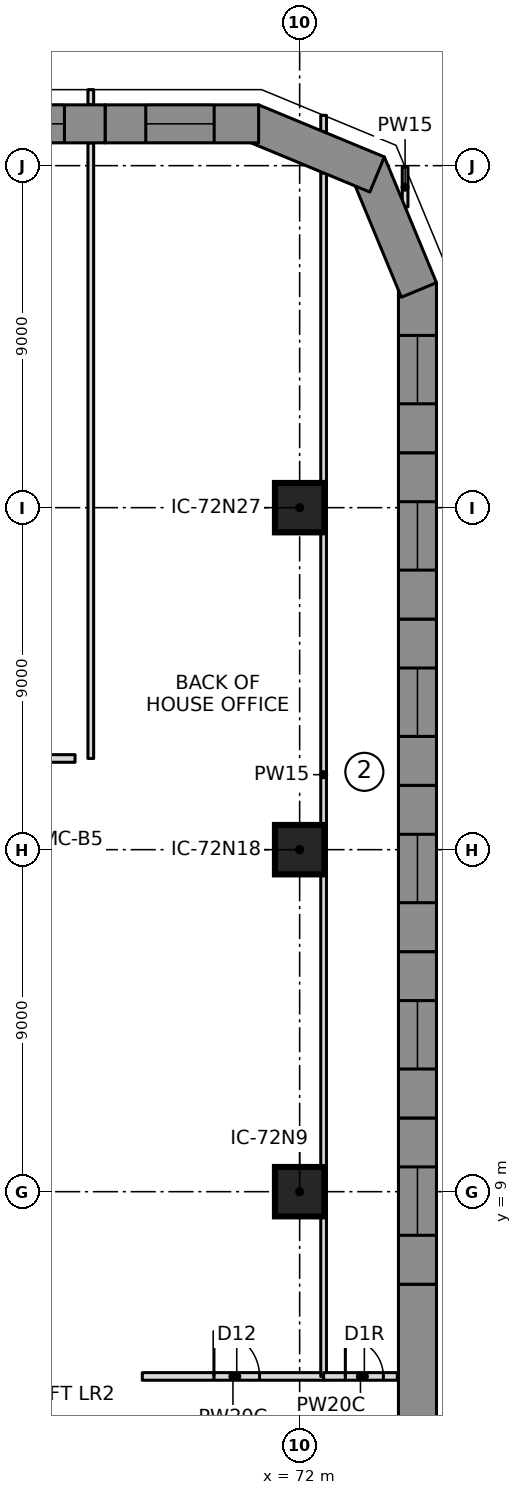
"""IFC4 building model, lengths in metres.
Left out: names, types, materials, properties, quantities, classifications, styles, units other than length and angle.
Written with IfcOpenShell. Run it as: python <this file> out.ifc"""

import sys

from ifc_helpers import new_model, si_unit, direction, frame, frame_2d, origin, origin_2d, place, context, subcontext, project, spatial, polyline, rectangle, outline, extrude, element, fill, save


model = new_model("IFC4")
c1 = context("Model", 3, precision=1e-05, world=origin(), true_north=direction((0.0, 1.0)))
c2 = subcontext(c1, "Body", "Model", "MODEL_VIEW")
j1 = project(units=[si_unit("LENGTHUNIT", "METRE"), si_unit("PLANEANGLEUNIT", "RADIAN")], contexts=[c1])
p1 = place(None, origin())
s1 = spatial("IfcSite", under=j1, at=p1, CompositionType="ELEMENT")
p2 = place(p1, origin())
s2 = spatial("IfcBuilding", under=s1, at=p2, CompositionType="ELEMENT")
p3 = place(p2, frame((0.0, 0.0, 24.0)))
s3 = spatial("IfcBuildingStorey", under=s2, at=p3, CompositionType="ELEMENT", Elevation=24.0)
for number, where, z_axis, x_axis in (
    (1, (72.0, 9.0, 0.0), (0.0, 0.0, 1.0), (1.0, 0.0, 0.0)),
    (2, (72.0, 18.0, 0.0), (0.0, 0.0, 1.0), (1.0, 0.0, 0.0)),
    (3, (72.0, 27.0, 0.0), (0.0, 0.0, 1.0), (1.0, 0.0, 0.0)),
):
    element("IfcColumn", number, at=place(p3, frame(where, z_axis=z_axis, x_axis=x_axis)), inside=s3, PredefinedType="COLUMN", context=c2, shape_type="SweptSolid", body=[
        extrude(rectangle(XDim=1.3, YDim=1.3, at=origin_2d()), origin(), (0.0, 0.0, 1.0), 4.65),
    ])
p4 = place(p3, frame((75.1, 2.188, 0.0), z_axis=(0.0, 0.0, 1.0), x_axis=(0.0, 1.0, 0.0)))
e4 = element("IfcWall", 4, at=p4, inside=s3, PredefinedType="NOTDEFINED", context=c2, shape_type="SweptSolid", body=[
    extrude(outline(polyline([(0.0, -0.5), (4.376, -0.5), (4.376, 0.5), (0.0, 0.5), (0.0, -0.5)])), origin(), (0.0, 0.0, 1.0), 4.7),
])
p5 = place(p3, frame((75.1, 6.564, 0.0), z_axis=(0.0, 0.0, 1.0), x_axis=(0.0, 1.0, 0.0)))
e5 = element("IfcWall", 5, at=p5, inside=s3, PredefinedType="NOTDEFINED", context=c2, shape_type="SweptSolid", body=[
    extrude(outline(polyline([(0.0, -0.5), (4.376, -0.5), (4.376, 0.5), (0.0, 0.5), (0.0, -0.5)])), origin(), (0.0, 0.0, 1.0), 4.7),
])
p6 = place(p5, frame((1.288, 0.0, 0.9)))
e6 = element("IfcOpeningElement", 6, at=p6, cuts=e5, PredefinedType="OPENING", context=c2, shape_type="SweptSolid", body=[
    extrude(rectangle(XDim=1.8, YDim=2.4, at=frame_2d((0.9, 1.2))), frame((0.0, 0.51, 0.0), z_axis=(0.0, -1.0, 0.0), x_axis=(1.0, 0.0, 0.0)), (0.0, 0.0, 1.0), 1.02),
])
p7 = place(p3, frame((75.1, 10.94, 0.0), z_axis=(0.0, 0.0, 1.0), x_axis=(0.0, 1.0, 0.0)))
e7 = element("IfcWall", 7, at=p7, inside=s3, PredefinedType="NOTDEFINED", context=c2, shape_type="SweptSolid", body=[
    extrude(outline(polyline([(0.0, -0.5), (4.376, -0.5), (4.376, 0.5), (0.0, 0.5), (0.0, -0.5)])), origin(), (0.0, 0.0, 1.0), 4.7),
])
p8 = place(p7, frame((1.288, 0.0, 0.9)))
e8 = element("IfcOpeningElement", 8, at=p8, cuts=e7, PredefinedType="OPENING", context=c2, shape_type="SweptSolid", body=[
    extrude(rectangle(XDim=1.8, YDim=2.4, at=frame_2d((0.9, 1.2))), frame((0.0, 0.51, 0.0), z_axis=(0.0, -1.0, 0.0), x_axis=(1.0, 0.0, 0.0)), (0.0, 0.0, 1.0), 1.02),
])
p9 = place(p3, frame((75.1, 15.316, 0.0), z_axis=(0.0, 0.0, 1.0), x_axis=(0.0, 1.0, 0.0)))
e9 = element("IfcWall", 9, at=p9, inside=s3, PredefinedType="NOTDEFINED", context=c2, shape_type="SweptSolid", body=[
    extrude(outline(polyline([(0.0, -0.5), (4.376, -0.5), (4.376, 0.5), (0.0, 0.5), (0.0, -0.5)])), origin(), (0.0, 0.0, 1.0), 4.7),
])
p10 = place(p9, frame((1.288, 0.0, 0.9)))
e10 = element("IfcOpeningElement", 10, at=p10, cuts=e9, PredefinedType="OPENING", context=c2, shape_type="SweptSolid", body=[
    extrude(rectangle(XDim=1.8, YDim=2.4, at=frame_2d((0.9, 1.2))), frame((0.0, 0.51, 0.0), z_axis=(0.0, -1.0, 0.0), x_axis=(1.0, 0.0, 0.0)), (0.0, 0.0, 1.0), 1.02),
])
p11 = place(p3, frame((75.1, 19.693, 0.0), z_axis=(0.0, 0.0, 1.0), x_axis=(0.0, 1.0, 0.0)))
e11 = element("IfcWall", 11, at=p11, inside=s3, PredefinedType="NOTDEFINED", context=c2, shape_type="SweptSolid", body=[
    extrude(outline(polyline([(0.0, -0.5), (4.376, -0.5), (4.376, 0.5), (0.0, 0.5), (0.0, -0.5)])), origin(), (0.0, 0.0, 1.0), 4.7),
])
p12 = place(p11, frame((1.288, 0.0, 0.9)))
e12 = element("IfcOpeningElement", 12, at=p12, cuts=e11, PredefinedType="OPENING", context=c2, shape_type="SweptSolid", body=[
    extrude(rectangle(XDim=1.8, YDim=2.4, at=frame_2d((0.9, 1.2))), frame((0.0, 0.51, 0.0), z_axis=(0.0, -1.0, 0.0), x_axis=(1.0, 0.0, 0.0)), (0.0, 0.0, 1.0), 1.02),
])
p13 = place(p3, frame((75.1, 24.069, 0.0), z_axis=(0.0, 0.0, 1.0), x_axis=(0.0, 1.0, 0.0)))
e13 = element("IfcWall", 13, at=p13, inside=s3, PredefinedType="NOTDEFINED", context=c2, shape_type="SweptSolid", body=[
    extrude(outline(polyline([(0.0, -0.5), (4.376, -0.5), (4.376, 0.5), (0.0, 0.5), (0.0, -0.5)])), origin(), (0.0, 0.0, 1.0), 4.7),
])
p14 = place(p13, frame((1.288, 0.0, 0.9)))
e14 = element("IfcOpeningElement", 14, at=p14, cuts=e13, PredefinedType="OPENING", context=c2, shape_type="SweptSolid", body=[
    extrude(rectangle(XDim=1.8, YDim=2.4, at=frame_2d((0.9, 1.2))), frame((0.0, 0.51, 0.0), z_axis=(0.0, -1.0, 0.0), x_axis=(1.0, 0.0, 0.0)), (0.0, 0.0, 1.0), 1.02),
])
p15 = place(p3, frame((75.1, 28.445, 0.0), z_axis=(0.0, 0.0, 1.0), x_axis=(0.0, 1.0, 0.0)))
e15 = element("IfcWall", 15, at=p15, inside=s3, PredefinedType="NOTDEFINED", context=c2, shape_type="SweptSolid", body=[
    extrude(outline(polyline([(0.0, -0.5), (4.476, -0.5), (4.277, 0.5), (0.0, 0.5), (0.0, -0.5)])), origin(), (0.0, 0.0, 1.0), 4.7),
])
p16 = place(p15, frame((1.288, 0.0, 0.9)))
e16 = element("IfcOpeningElement", 16, at=p16, cuts=e15, PredefinedType="OPENING", context=c2, shape_type="SweptSolid", body=[
    extrude(rectangle(XDim=1.8, YDim=2.4, at=frame_2d((0.9, 1.2))), frame((0.0, 0.51, 0.0), z_axis=(0.0, -1.0, 0.0), x_axis=(1.0, 0.0, 0.0)), (0.0, 0.0, 1.0), 1.02),
])
p17 = place(p3, frame((75.1, 32.821, 0.0), z_axis=(0.0, 0.0, 1.0), x_axis=(-0.382724875529, 0.923862365102, 0.0)))
e17 = element("IfcWall", 17, at=p17, inside=s3, PredefinedType="NOTDEFINED", context=c2, shape_type="SweptSolid", body=[
    extrude(outline(polyline([(-0.1, -0.5), (3.482, -0.5), (3.068, 0.5), (0.1, 0.5), (-0.1, -0.5)])), origin(), (0.0, 0.0, 1.0), 4.7),
])
p18 = place(p3, frame((73.847, 35.847, 0.0), z_axis=(0.0, 0.0, 1.0), x_axis=(-0.923862365102, 0.382724875529, 0.0)))
e18 = element("IfcWall", 18, at=p18, inside=s3, PredefinedType="NOTDEFINED", context=c2, shape_type="SweptSolid", body=[
    extrude(outline(polyline([(-0.207, -0.5), (3.375, -0.5), (3.175, 0.5), (0.207, 0.5), (-0.207, -0.5)])), origin(), (0.0, 0.0, 1.0), 4.7),
])
p19 = place(p3, frame((70.821, 37.1, 0.0), z_axis=(0.0, 0.0, 1.0), x_axis=(-1.0, 0.0, 0.0)))
e19 = element("IfcWall", 19, at=p19, inside=s3, PredefinedType="NOTDEFINED", context=c2, shape_type="SweptSolid", body=[
    extrude(outline(polyline([(-0.1, -0.5), (3.94, -0.5), (3.94, 0.5), (0.1, 0.5), (-0.1, -0.5)])), origin(), (0.0, 0.0, 1.0), 4.7),
])
p20 = place(p19, frame((1.07, 0.0, 0.9)))
e20 = element("IfcOpeningElement", 20, at=p20, cuts=e19, PredefinedType="OPENING", context=c2, shape_type="SweptSolid", body=[
    extrude(rectangle(XDim=1.8, YDim=2.4, at=frame_2d((0.9, 1.2))), frame((0.0, 0.51, 0.0), z_axis=(0.0, -1.0, 0.0), x_axis=(1.0, 0.0, 0.0)), (0.0, 0.0, 1.0), 1.02),
])
p21 = place(p3, frame((66.881, 37.1, 0.0), z_axis=(0.0, 0.0, 1.0), x_axis=(-1.0, 0.0, 0.0)))
e21 = element("IfcWall", 21, at=p21, inside=s3, PredefinedType="NOTDEFINED", context=c2, shape_type="SweptSolid", body=[
    extrude(outline(polyline([(0.0, -0.5), (3.94, -0.5), (3.94, 0.5), (0.0, 0.5), (0.0, -0.5)])), origin(), (0.0, 0.0, 1.0), 4.7),
])
p22 = place(p21, frame((1.07, 0.0, 0.9)))
e22 = element("IfcOpeningElement", 22, at=p22, cuts=e21, PredefinedType="OPENING", context=c2, shape_type="SweptSolid", body=[
    extrude(rectangle(XDim=1.8, YDim=2.4, at=frame_2d((0.9, 1.2))), frame((0.0, 0.51, 0.0), z_axis=(0.0, -1.0, 0.0), x_axis=(1.0, 0.0, 0.0)), (0.0, 0.0, 1.0), 1.02),
])
p23 = place(p3, frame((66.504, 20.4, 0.0), z_axis=(0.0, 0.0, 1.0), x_axis=(0.0, 1.0, 0.0)))
e23 = element("IfcWall", 23, at=p23, inside=s3, PredefinedType="PARTITIONING", context=c2, shape_type="SweptSolid", body=[
    extrude(rectangle(XDim=16.2, YDim=0.15, at=frame_2d((8.1, 0.0))), origin(), (0.0, 0.0, 1.0), 4.55),
])
p24 = place(p3, frame((66.504, 37.6, 0.0), z_axis=(0.0, 0.0, 1.0), x_axis=(0.0, 1.0, 0.0)))
e24 = element("IfcWall", 24, at=p24, inside=s3, PredefinedType="PARTITIONING", context=c2, shape_type="SweptSolid", body=[
    extrude(rectangle(XDim=0.4, YDim=0.15, at=frame_2d((0.2, 0.0))), origin(), (0.0, 0.0, 1.0), 4.55),
])
p25 = place(p3, frame((67.859, 4.139, 0.0), z_axis=(0.0, 0.0, 1.0), x_axis=(1.0, 0.0, 0.0)))
e25 = element("IfcWall", 25, at=p25, inside=s3, PredefinedType="PARTITIONING", context=c2, shape_type="SweptSolid", body=[
    extrude(rectangle(XDim=4.772, YDim=0.2, at=frame_2d((2.386, 0.0))), origin(), (0.0, 0.0, 1.0), 4.55),
])
p26 = place(p25, frame((1.886, 0.0, 0.0)))
e26 = element("IfcOpeningElement", 26, at=p26, cuts=e25, PredefinedType="OPENING", context=c2, shape_type="SweptSolid", body=[
    extrude(rectangle(XDim=1.2, YDim=2.1, at=frame_2d((0.6, 1.05))), frame((0.0, 0.11, 0.0), z_axis=(0.0, -1.0, 0.0), x_axis=(1.0, 0.0, 0.0)), (0.0, 0.0, 1.0), 0.22),
])
p27 = place(p3, frame((72.631, 4.139, 0.0), z_axis=(0.0, 0.0, 1.0), x_axis=(0.0, 1.0, 0.0)))
e27 = element("IfcWall", 27, at=p27, inside=s3, PredefinedType="PARTITIONING", context=c2, shape_type="SweptSolid", body=[
    extrude(rectangle(XDim=31.67, YDim=0.15, at=frame_2d((15.835, 0.0))), origin(), (0.0, 0.0, 1.0), 4.55),
])
p28 = place(p3, frame((72.631, 36.892, 0.0), z_axis=(0.0, 0.0, 1.0), x_axis=(0.0, 1.0, 0.0)))
e28 = element("IfcWall", 28, at=p28, inside=s3, PredefinedType="PARTITIONING", context=c2, shape_type="SweptSolid", body=[
    extrude(rectangle(XDim=0.433, YDim=0.15, at=frame_2d((0.217, 0.0))), origin(), (0.0, 0.0, 1.0), 4.55),
])
p29 = place(p3, frame((72.631, 4.139, 0.0), z_axis=(0.0, 0.0, 1.0), x_axis=(1.0, 0.0, 0.0)))
e29 = element("IfcWall", 29, at=p29, inside=s3, PredefinedType="PARTITIONING", context=c2, shape_type="SweptSolid", body=[
    extrude(rectangle(XDim=1.939, YDim=0.2, at=frame_2d((0.97, 0.0))), origin(), (0.0, 0.0, 1.0), 4.55),
])
p30 = place(p29, frame((0.572, 0.0, 0.0)))
e30 = element("IfcOpeningElement", 30, at=p30, cuts=e29, PredefinedType="OPENING", context=c2, shape_type="SweptSolid", body=[
    extrude(rectangle(XDim=1.0, YDim=2.1, at=frame_2d((0.5, 1.05))), frame((0.0, 0.11, 0.0), z_axis=(0.0, -1.0, 0.0), x_axis=(1.0, 0.0, 0.0)), (0.0, 0.0, 1.0), 0.22),
])
p31 = place(p3, frame((74.775, 34.913, 0.0), z_axis=(0.0, 0.0, 1.0), x_axis=(0.0, 1.0, 0.0)))
e31 = element("IfcWall", 31, at=p31, inside=s3, PredefinedType="PARTITIONING", context=c2, shape_type="SweptSolid", body=[
    extrude(rectangle(XDim=1.045, YDim=0.15, at=frame_2d((0.523, 0.0))), origin(), (0.0, 0.0, 1.0), 4.55),
])
p32 = place(p3, frame((66.09, 20.4, 0.0), z_axis=(0.0, 0.0, 1.0), x_axis=(-1.0, 0.0, 0.0)))
e32 = element("IfcWall", 32, at=p32, inside=s3, PredefinedType="PARTITIONING", context=c2, shape_type="SweptSolid", body=[
    extrude(rectangle(XDim=5.712, YDim=0.2, at=frame_2d((2.856, 0.0))), origin(), (0.0, 0.0, 1.0), 4.55),
])
p33 = place(p32, frame((3.05, 0.0, 0.0)))
e33 = element("IfcOpeningElement", 33, at=p33, cuts=e32, PredefinedType="OPENING", context=c2, shape_type="SweptSolid", body=[
    extrude(rectangle(XDim=1.0, YDim=2.1, at=frame_2d((0.5, 1.05))), frame((0.0, 0.11, 0.0), z_axis=(0.0, -1.0, 0.0), x_axis=(1.0, 0.0, 0.0)), (0.0, 0.0, 1.0), 0.22),
])
p34 = place(p6, origin())
e34 = element("IfcWindow", 34, at=p34, inside=s3, PartitioningType="SINGLE_PANEL", PredefinedType="WINDOW", context=c2, shape_type="SweptSolid", body=[
    extrude(rectangle(XDim=1.8, YDim=2.4, at=frame_2d((0.9, 1.2))), frame((0.0, 0.5, 0.0), z_axis=(0.0, -1.0, 0.0), x_axis=(1.0, 0.0, 0.0)), (0.0, 0.0, 1.0), 0.06),
])
fill(e6, e34)
p35 = place(p8, origin())
e35 = element("IfcWindow", 35, at=p35, inside=s3, PartitioningType="SINGLE_PANEL", PredefinedType="WINDOW", context=c2, shape_type="SweptSolid", body=[
    extrude(rectangle(XDim=1.8, YDim=2.4, at=frame_2d((0.9, 1.2))), frame((0.0, 0.5, 0.0), z_axis=(0.0, -1.0, 0.0), x_axis=(1.0, 0.0, 0.0)), (0.0, 0.0, 1.0), 0.06),
])
fill(e8, e35)
p36 = place(p10, origin())
e36 = element("IfcWindow", 36, at=p36, inside=s3, PartitioningType="SINGLE_PANEL", PredefinedType="WINDOW", context=c2, shape_type="SweptSolid", body=[
    extrude(rectangle(XDim=1.8, YDim=2.4, at=frame_2d((0.9, 1.2))), frame((0.0, 0.5, 0.0), z_axis=(0.0, -1.0, 0.0), x_axis=(1.0, 0.0, 0.0)), (0.0, 0.0, 1.0), 0.06),
])
fill(e10, e36)
p37 = place(p12, origin())
e37 = element("IfcWindow", 37, at=p37, inside=s3, PartitioningType="SINGLE_PANEL", PredefinedType="WINDOW", context=c2, shape_type="SweptSolid", body=[
    extrude(rectangle(XDim=1.8, YDim=2.4, at=frame_2d((0.9, 1.2))), frame((0.0, 0.5, 0.0), z_axis=(0.0, -1.0, 0.0), x_axis=(1.0, 0.0, 0.0)), (0.0, 0.0, 1.0), 0.06),
])
fill(e12, e37)
p38 = place(p14, origin())
e38 = element("IfcWindow", 38, at=p38, inside=s3, PartitioningType="SINGLE_PANEL", PredefinedType="WINDOW", context=c2, shape_type="SweptSolid", body=[
    extrude(rectangle(XDim=1.8, YDim=2.4, at=frame_2d((0.9, 1.2))), frame((0.0, 0.5, 0.0), z_axis=(0.0, -1.0, 0.0), x_axis=(1.0, 0.0, 0.0)), (0.0, 0.0, 1.0), 0.06),
])
fill(e14, e38)
p39 = place(p16, origin())
e39 = element("IfcWindow", 39, at=p39, inside=s3, PartitioningType="SINGLE_PANEL", PredefinedType="WINDOW", context=c2, shape_type="SweptSolid", body=[
    extrude(rectangle(XDim=1.8, YDim=2.4, at=frame_2d((0.9, 1.2))), frame((0.0, 0.5, 0.0), z_axis=(0.0, -1.0, 0.0), x_axis=(1.0, 0.0, 0.0)), (0.0, 0.0, 1.0), 0.06),
])
fill(e16, e39)
p40 = place(p20, origin())
e40 = element("IfcWindow", 40, at=p40, inside=s3, PartitioningType="SINGLE_PANEL", PredefinedType="WINDOW", context=c2, shape_type="SweptSolid", body=[
    extrude(rectangle(XDim=1.8, YDim=2.4, at=frame_2d((0.9, 1.2))), frame((0.0, 0.5, 0.0), z_axis=(0.0, -1.0, 0.0), x_axis=(1.0, 0.0, 0.0)), (0.0, 0.0, 1.0), 0.06),
])
fill(e20, e40)
p41 = place(p22, origin())
e41 = element("IfcWindow", 41, at=p41, inside=s3, PartitioningType="SINGLE_PANEL", PredefinedType="WINDOW", context=c2, shape_type="SweptSolid", body=[
    extrude(rectangle(XDim=1.8, YDim=2.4, at=frame_2d((0.9, 1.2))), frame((0.0, 0.5, 0.0), z_axis=(0.0, -1.0, 0.0), x_axis=(1.0, 0.0, 0.0)), (0.0, 0.0, 1.0), 0.06),
])
fill(e22, e41)
p42 = place(p26, origin())
e42 = element("IfcDoor", 42, at=p42, inside=s3, OperationType="SINGLE_SWING_RIGHT", PredefinedType="DOOR", context=c2, shape_type="SweptSolid", body=[
    extrude(rectangle(XDim=1.2, YDim=2.1, at=frame_2d((0.6, 1.05))), frame((0.0, 0.025, 0.0), z_axis=(0.0, -1.0, 0.0), x_axis=(1.0, 0.0, 0.0)), (0.0, 0.0, 1.0), 0.05),
])
fill(e26, e42)
p43 = place(p30, origin())
e43 = element("IfcDoor", 43, at=p43, inside=s3, OperationType="SINGLE_SWING_RIGHT", PredefinedType="DOOR", context=c2, shape_type="SweptSolid", body=[
    extrude(rectangle(XDim=1.0, YDim=2.1, at=frame_2d((0.5, 1.05))), frame((0.0, 0.025, 0.0), z_axis=(0.0, -1.0, 0.0), x_axis=(1.0, 0.0, 0.0)), (0.0, 0.0, 1.0), 0.05),
])
fill(e30, e43)
save(model, sys.argv[1])
